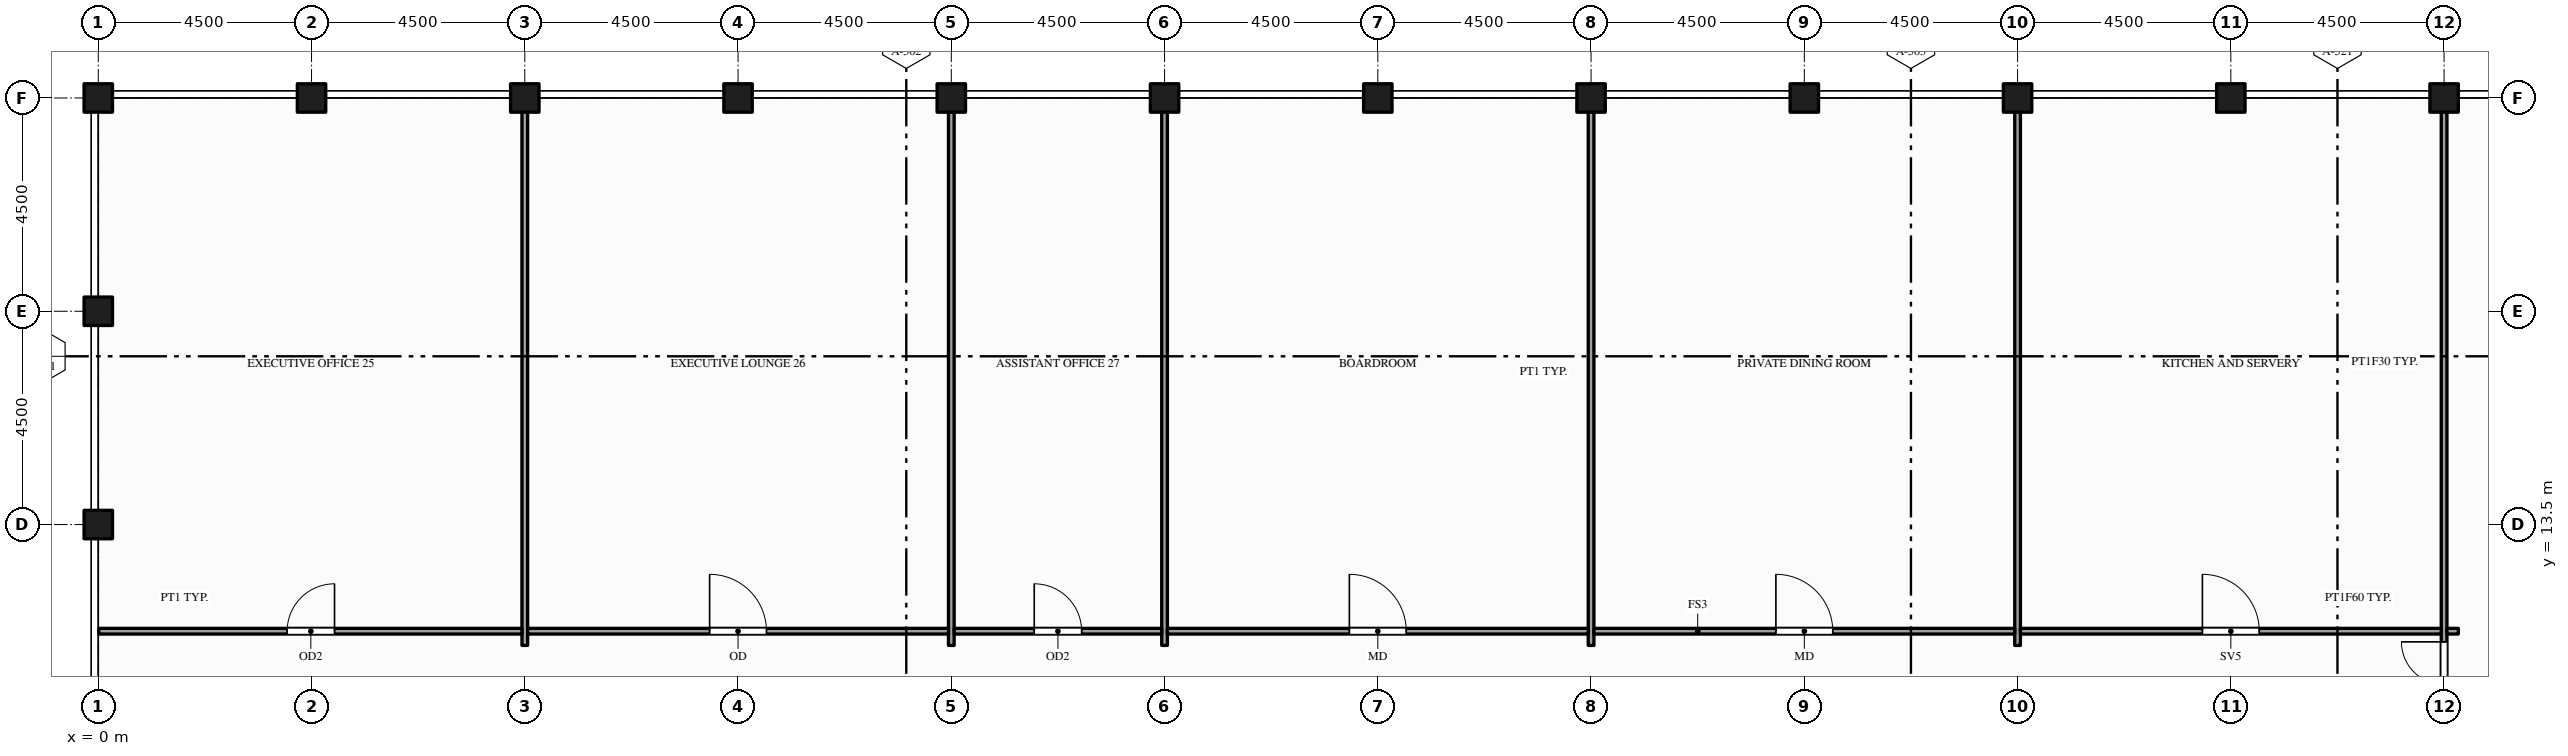
"""IFC4 building model, lengths in metres.
Left out: names, types, materials, properties, quantities, classifications, styles, units other than length and angle.
Written with IfcOpenShell. Run it as: python <this file> out.ifc"""

import sys

from ifc_helpers import new_model, si_unit, direction, frame, frame_2d, origin, origin_2d, place, context, subcontext, project, spatial, rectangle, hollow_rectangle, extrude, element, fill, save


model = new_model("IFC4")
c1 = context("Model", 3, precision=1e-05, world=origin(), true_north=direction((0.0, 1.0)))
c2 = subcontext(c1, "Body", "Model", "MODEL_VIEW")
j1 = project(units=[si_unit("LENGTHUNIT", "METRE"), si_unit("PLANEANGLEUNIT", "RADIAN")], contexts=[c1])
p1 = place(None, origin())
s1 = spatial("IfcSite", under=j1, at=p1, CompositionType="ELEMENT")
p2 = place(p1, origin())
s2 = spatial("IfcBuilding", under=s1, at=p2, CompositionType="ELEMENT")
p3 = place(p2, frame((0.0, 0.0, 327.5)))
s3 = spatial("IfcBuildingStorey", under=s2, at=p3, CompositionType="ELEMENT", Elevation=327.5)
for number, where, z_axis, x_axis in (
    (1, (0.0, 13.5, -0.15), (0.0, 0.0, 1.0), (1.0, 0.0, 0.0)),
    (2, (0.0, 18.0, -0.15), (0.0, 0.0, 1.0), (1.0, 0.0, 0.0)),
    (3, (0.0, 22.5, -0.15), (0.0, 0.0, 1.0), (1.0, 0.0, 0.0)),
    (4, (4.5, 22.5, -0.15), (0.0, 0.0, 1.0), (1.0, 0.0, 0.0)),
    (5, (9.0, 22.5, -0.15), (0.0, 0.0, 1.0), (1.0, 0.0, 0.0)),
    (6, (13.5, 22.5, -0.15), (0.0, 0.0, 1.0), (1.0, 0.0, 0.0)),
    (7, (18.0, 22.5, -0.15), (0.0, 0.0, 1.0), (1.0, 0.0, 0.0)),
    (8, (22.5, 22.5, -0.15), (0.0, 0.0, 1.0), (1.0, 0.0, 0.0)),
    (9, (27.0, 22.5, -0.15), (0.0, 0.0, 1.0), (1.0, 0.0, 0.0)),
    (10, (31.5, 22.5, -0.15), (0.0, 0.0, 1.0), (1.0, 0.0, 0.0)),
    (11, (36.0, 22.5, -0.15), (0.0, 0.0, 1.0), (1.0, 0.0, 0.0)),
    (12, (40.5, 22.5, -0.15), (0.0, 0.0, 1.0), (1.0, 0.0, 0.0)),
    (13, (45.0, 22.5, -0.15), (0.0, 0.0, 1.0), (1.0, 0.0, 0.0)),
    (14, (49.5, 22.5, -0.15), (0.0, 0.0, 1.0), (1.0, 0.0, 0.0)),
):
    element("IfcColumn", number, at=place(p3, frame(where, z_axis=z_axis, x_axis=x_axis)), inside=s3, PredefinedType="COLUMN", context=c2, shape_type="SweptSolid", body=[
        extrude(hollow_rectangle(XDim=0.6, YDim=0.6, WallThickness=0.03, at=origin_2d()), origin(), (0.0, 0.0, 1.0), 4.5),
    ])
for number, where, z_axis, x_axis in (
    (15, (9.0, 10.95, 0.0), (0.0, 0.0, 1.0), (0.0, 1.0, 0.0)),
    (16, (18.0, 10.95, 0.0), (0.0, 0.0, 1.0), (0.0, 1.0, 0.0)),
    (17, (22.5, 10.95, 0.0), (0.0, 0.0, 1.0), (0.0, 1.0, 0.0)),
    (18, (31.5, 10.95, 0.0), (0.0, 0.0, 1.0), (0.0, 1.0, 0.0)),
    (19, (40.5, 10.95, 0.0), (0.0, 0.0, 1.0), (0.0, 1.0, 0.0)),
):
    element("IfcWall", number, at=place(p3, frame(where, z_axis=z_axis, x_axis=x_axis)), inside=s3, PredefinedType="PARTITIONING", context=c2, shape_type="SweptSolid", body=[
        extrude(rectangle(XDim=11.54, YDim=0.12, at=frame_2d((5.77, 0.0))), origin(), (0.0, 0.0, 1.0), 3.359),
    ])
p4 = place(p3, frame((49.5, 0.01, 0.0), z_axis=(0.0, 0.0, 1.0), x_axis=(0.0, 1.0, 0.0)))
e20 = element("IfcWall", 20, at=p4, inside=s3, PredefinedType="PARTITIONING", context=c2, shape_type="SweptSolid", body=[
    extrude(rectangle(XDim=22.48, YDim=0.12, at=frame_2d((11.24, 0.0))), origin(), (0.0, 0.0, 1.0), 3.359),
])
p5 = place(p4, frame((9.215, 0.0, 0.0)))
e21 = element("IfcOpeningElement", 21, at=p5, cuts=e20, PredefinedType="OPENING", context=c2, shape_type="SweptSolid", body=[
    extrude(rectangle(XDim=1.8, YDim=2.1, at=frame_2d((0.9, 1.05))), frame((0.0, 0.07, 0.0), z_axis=(0.0, -1.0, 0.0), x_axis=(1.0, 0.0, 0.0)), (0.0, 0.0, 1.0), 0.14),
])
p6 = place(p4, frame((0.99, 0.0, 0.0)))
e22 = element("IfcOpeningElement", 22, at=p6, cuts=e20, PredefinedType="OPENING", context=c2, shape_type="SweptSolid", body=[
    extrude(rectangle(XDim=0.9, YDim=2.1, at=frame_2d((0.45, 1.05))), frame((0.0, 0.07, 0.0), z_axis=(0.0, -1.0, 0.0), x_axis=(1.0, 0.0, 0.0)), (0.0, 0.0, 1.0), 0.14),
])
p7 = place(p4, frame((4.04, 0.0, 0.0)))
e23 = element("IfcOpeningElement", 23, at=p7, cuts=e20, PredefinedType="OPENING", context=c2, shape_type="SweptSolid", body=[
    extrude(rectangle(XDim=0.9, YDim=2.1, at=frame_2d((0.45, 1.05))), frame((0.0, 0.07, 0.0), z_axis=(0.0, -1.0, 0.0), x_axis=(1.0, 0.0, 0.0)), (0.0, 0.0, 1.0), 0.14),
])
p8 = place(p4, frame((6.99, 0.0, 0.0)))
e24 = element("IfcOpeningElement", 24, at=p8, cuts=e20, PredefinedType="OPENING", context=c2, shape_type="SweptSolid", body=[
    extrude(rectangle(XDim=1.0, YDim=2.1, at=frame_2d((0.5, 1.05))), frame((0.0, 0.07, 0.0), z_axis=(0.0, -1.0, 0.0), x_axis=(1.0, 0.0, 0.0)), (0.0, 0.0, 1.0), 0.14),
])
p9 = place(p3, frame((0.01, 11.25, 0.0), z_axis=(0.0, 0.0, 1.0), x_axis=(1.0, 0.0, 0.0)))
e25 = element("IfcWall", 25, at=p9, inside=s3, PredefinedType="PARTITIONING", context=c2, shape_type="SweptSolid", body=[
    extrude(rectangle(XDim=8.93, YDim=0.12, at=frame_2d((4.465, 0.0))), origin(), (0.0, 0.0, 1.0), 3.359),
])
p10 = place(p9, frame((3.975, 0.0, 0.0)))
e26 = element("IfcOpeningElement", 26, at=p10, cuts=e25, PredefinedType="OPENING", context=c2, shape_type="SweptSolid", body=[
    extrude(rectangle(XDim=1.0, YDim=2.1, at=frame_2d((0.5, 1.05))), frame((0.0, 0.07, 0.0), z_axis=(0.0, -1.0, 0.0), x_axis=(1.0, 0.0, 0.0)), (0.0, 0.0, 1.0), 0.14),
])
p11 = place(p3, frame((9.06, 11.25, 0.0), z_axis=(0.0, 0.0, 1.0), x_axis=(1.0, 0.0, 0.0)))
e27 = element("IfcWall", 27, at=p11, inside=s3, PredefinedType="PARTITIONING", context=c2, shape_type="SweptSolid", body=[
    extrude(rectangle(XDim=8.88, YDim=0.12, at=frame_2d((4.44, 0.0))), origin(), (0.0, 0.0, 1.0), 3.359),
])
p12 = place(p11, frame((3.84, 0.0, 0.0)))
e28 = element("IfcOpeningElement", 28, at=p12, cuts=e27, PredefinedType="OPENING", context=c2, shape_type="SweptSolid", body=[
    extrude(rectangle(XDim=1.2, YDim=2.1, at=frame_2d((0.6, 1.05))), frame((0.0, 0.07, 0.0), z_axis=(0.0, -1.0, 0.0), x_axis=(1.0, 0.0, 0.0)), (0.0, 0.0, 1.0), 0.14),
])
p13 = place(p3, frame((18.06, 11.25, 0.0), z_axis=(0.0, 0.0, 1.0), x_axis=(1.0, 0.0, 0.0)))
e29 = element("IfcWall", 29, at=p13, inside=s3, PredefinedType="PARTITIONING", context=c2, shape_type="SweptSolid", body=[
    extrude(rectangle(XDim=4.38, YDim=0.12, at=frame_2d((2.19, 0.0))), origin(), (0.0, 0.0, 1.0), 3.359),
])
p14 = place(p13, frame((1.69, 0.0, 0.0)))
e30 = element("IfcOpeningElement", 30, at=p14, cuts=e29, PredefinedType="OPENING", context=c2, shape_type="SweptSolid", body=[
    extrude(rectangle(XDim=1.0, YDim=2.1, at=frame_2d((0.5, 1.05))), frame((0.0, 0.07, 0.0), z_axis=(0.0, -1.0, 0.0), x_axis=(1.0, 0.0, 0.0)), (0.0, 0.0, 1.0), 0.14),
])
p15 = place(p3, frame((22.56, 11.25, 0.0), z_axis=(0.0, 0.0, 1.0), x_axis=(1.0, 0.0, 0.0)))
e31 = element("IfcWall", 31, at=p15, inside=s3, PredefinedType="PARTITIONING", context=c2, shape_type="SweptSolid", body=[
    extrude(rectangle(XDim=8.88, YDim=0.12, at=frame_2d((4.44, 0.0))), origin(), (0.0, 0.0, 1.0), 3.359),
])
p16 = place(p15, frame((3.84, 0.0, 0.0)))
e32 = element("IfcOpeningElement", 32, at=p16, cuts=e31, PredefinedType="OPENING", context=c2, shape_type="SweptSolid", body=[
    extrude(rectangle(XDim=1.2, YDim=2.1, at=frame_2d((0.6, 1.05))), frame((0.0, 0.07, 0.0), z_axis=(0.0, -1.0, 0.0), x_axis=(1.0, 0.0, 0.0)), (0.0, 0.0, 1.0), 0.14),
])
p17 = place(p3, frame((31.56, 11.25, 0.0), z_axis=(0.0, 0.0, 1.0), x_axis=(1.0, 0.0, 0.0)))
e33 = element("IfcWall", 33, at=p17, inside=s3, PredefinedType="PARTITIONING", context=c2, shape_type="SweptSolid", body=[
    extrude(rectangle(XDim=8.88, YDim=0.12, at=frame_2d((4.44, 0.0))), origin(), (0.0, 0.0, 1.0), 3.359),
])
p18 = place(p17, frame((3.84, 0.0, 0.0)))
e34 = element("IfcOpeningElement", 34, at=p18, cuts=e33, PredefinedType="OPENING", context=c2, shape_type="SweptSolid", body=[
    extrude(rectangle(XDim=1.2, YDim=2.1, at=frame_2d((0.6, 1.05))), frame((0.0, 0.07, 0.0), z_axis=(0.0, -1.0, 0.0), x_axis=(1.0, 0.0, 0.0)), (0.0, 0.0, 1.0), 0.14),
])
p19 = place(p3, frame((40.56, 11.25, 0.0), z_axis=(0.0, 0.0, 1.0), x_axis=(1.0, 0.0, 0.0)))
e35 = element("IfcWall", 35, at=p19, inside=s3, PredefinedType="PARTITIONING", context=c2, shape_type="SweptSolid", body=[
    extrude(rectangle(XDim=8.88, YDim=0.12, at=frame_2d((4.44, 0.0))), origin(), (0.0, 0.0, 1.0), 3.359),
])
p20 = place(p19, frame((3.84, 0.0, 0.0)))
e36 = element("IfcOpeningElement", 36, at=p20, cuts=e35, PredefinedType="OPENING", context=c2, shape_type="SweptSolid", body=[
    extrude(rectangle(XDim=1.2, YDim=2.1, at=frame_2d((0.6, 1.05))), frame((0.0, 0.07, 0.0), z_axis=(0.0, -1.0, 0.0), x_axis=(1.0, 0.0, 0.0)), (0.0, 0.0, 1.0), 0.14),
])
p21 = place(p3, frame((49.56, 11.25, 0.0), z_axis=(0.0, 0.0, 1.0), x_axis=(1.0, 0.0, 0.0)))
e37 = element("IfcWall", 37, at=p21, inside=s3, PredefinedType="PARTITIONING", context=c2, shape_type="SweptSolid", body=[
    extrude(rectangle(XDim=0.24, YDim=0.12, at=frame_2d((0.12, 0.0))), origin(), (0.0, 0.0, 1.0), 3.359),
])
p22 = place(p5, origin())
e38 = element("IfcDoor", 38, at=p22, inside=s3, OperationType="DOUBLE_DOOR_SINGLE_SWING", PredefinedType="DOOR", context=c2, shape_type="SweptSolid", body=[
    extrude(rectangle(XDim=1.8, YDim=2.1, at=frame_2d((0.9, 1.05))), frame((0.0, 0.025, 0.0), z_axis=(0.0, -1.0, 0.0), x_axis=(1.0, 0.0, 0.0)), (0.0, 0.0, 1.0), 0.05),
])
fill(e21, e38)
p23 = place(p10, origin())
e39 = element("IfcDoor", 39, at=p23, inside=s3, OperationType="SINGLE_SWING_RIGHT", PredefinedType="DOOR", context=c2, shape_type="SweptSolid", body=[
    extrude(rectangle(XDim=1.0, YDim=2.1, at=frame_2d((0.5, 1.05))), frame((0.0, 0.025, 0.0), z_axis=(0.0, -1.0, 0.0), x_axis=(1.0, 0.0, 0.0)), (0.0, 0.0, 1.0), 0.05),
])
fill(e26, e39)
p24 = place(p12, origin())
e40 = element("IfcDoor", 40, at=p24, inside=s3, OperationType="SINGLE_SWING_LEFT", PredefinedType="DOOR", context=c2, shape_type="SweptSolid", body=[
    extrude(rectangle(XDim=1.2, YDim=2.1, at=frame_2d((0.6, 1.05))), frame((0.0, 0.025, 0.0), z_axis=(0.0, -1.0, 0.0), x_axis=(1.0, 0.0, 0.0)), (0.0, 0.0, 1.0), 0.05),
])
fill(e28, e40)
p25 = place(p14, origin())
e41 = element("IfcDoor", 41, at=p25, inside=s3, OperationType="SINGLE_SWING_LEFT", PredefinedType="DOOR", context=c2, shape_type="SweptSolid", body=[
    extrude(rectangle(XDim=1.0, YDim=2.1, at=frame_2d((0.5, 1.05))), frame((0.0, 0.025, 0.0), z_axis=(0.0, -1.0, 0.0), x_axis=(1.0, 0.0, 0.0)), (0.0, 0.0, 1.0), 0.05),
])
fill(e30, e41)
p26 = place(p16, origin())
e42 = element("IfcDoor", 42, at=p26, inside=s3, OperationType="SINGLE_SWING_LEFT", PredefinedType="DOOR", context=c2, shape_type="SweptSolid", body=[
    extrude(rectangle(XDim=1.2, YDim=2.1, at=frame_2d((0.6, 1.05))), frame((0.0, 0.025, 0.0), z_axis=(0.0, -1.0, 0.0), x_axis=(1.0, 0.0, 0.0)), (0.0, 0.0, 1.0), 0.05),
])
fill(e32, e42)
p27 = place(p18, origin())
e43 = element("IfcDoor", 43, at=p27, inside=s3, OperationType="SINGLE_SWING_LEFT", PredefinedType="DOOR", context=c2, shape_type="SweptSolid", body=[
    extrude(rectangle(XDim=1.2, YDim=2.1, at=frame_2d((0.6, 1.05))), frame((0.0, 0.025, 0.0), z_axis=(0.0, -1.0, 0.0), x_axis=(1.0, 0.0, 0.0)), (0.0, 0.0, 1.0), 0.05),
])
fill(e34, e43)
p28 = place(p20, origin())
e44 = element("IfcDoor", 44, at=p28, inside=s3, OperationType="SINGLE_SWING_LEFT", PredefinedType="DOOR", context=c2, shape_type="SweptSolid", body=[
    extrude(rectangle(XDim=1.2, YDim=2.1, at=frame_2d((0.6, 1.05))), frame((0.0, 0.025, 0.0), z_axis=(0.0, -1.0, 0.0), x_axis=(1.0, 0.0, 0.0)), (0.0, 0.0, 1.0), 0.05),
])
fill(e36, e44)
save(model, sys.argv[1])
